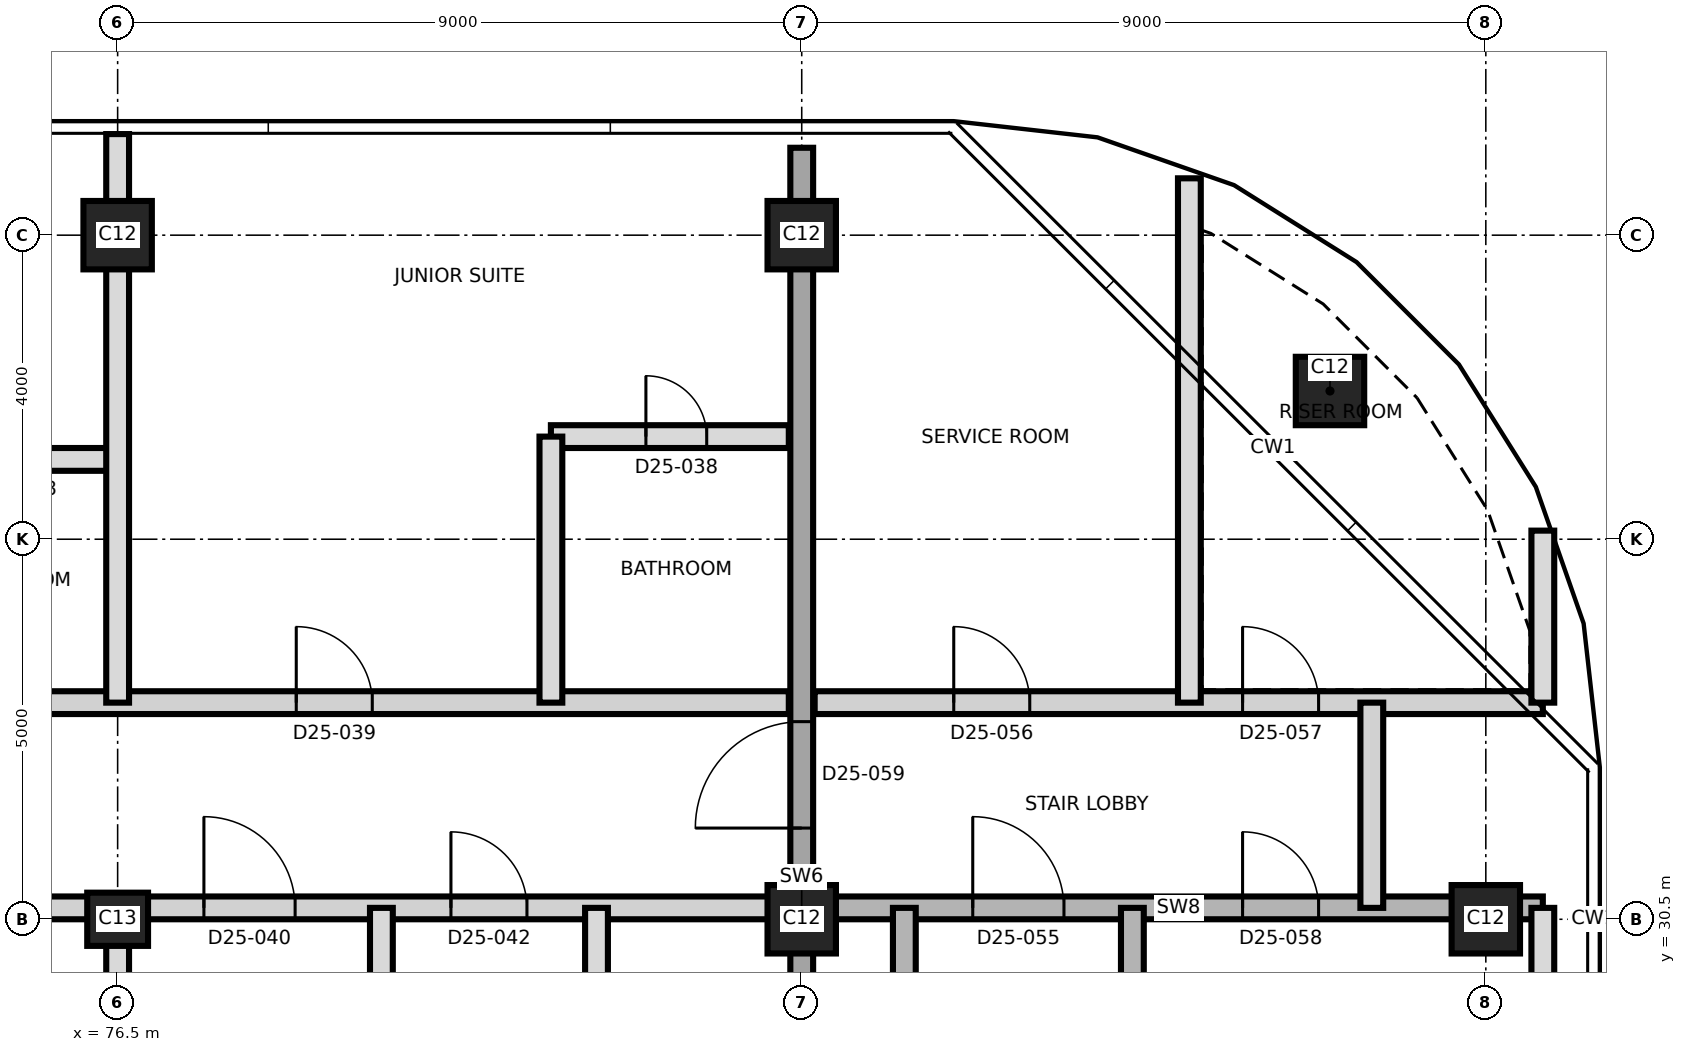
"""IFC4 building model, lengths in metres.
Left out: names, types, materials, properties, quantities, classifications, styles, units other than length and angle.
Written with IfcOpenShell. Run it as: python <this file> out.ifc"""

import sys

from ifc_helpers import new_model, si_unit, direction, frame, frame_2d, origin, origin_2d, place, context, subcontext, project, spatial, rectangle, extrude, element, fill, save


model = new_model("IFC4")
c1 = context("Model", 3, precision=1e-05, world=origin(), true_north=direction((0.0, 1.0)))
c2 = subcontext(c1, "Body", "Model", "MODEL_VIEW")
j1 = project(units=[si_unit("LENGTHUNIT", "METRE"), si_unit("PLANEANGLEUNIT", "RADIAN")], contexts=[c1])
p1 = place(None, origin())
s1 = spatial("IfcSite", under=j1, at=p1, CompositionType="ELEMENT")
p2 = place(p1, origin())
s2 = spatial("IfcBuilding", under=s1, at=p2, CompositionType="ELEMENT")
p3 = place(p2, frame((0.0, 0.0, 229.1)))
s3 = spatial("IfcBuildingStorey", under=s2, at=p3, CompositionType="ELEMENT", Elevation=229.1)
p4 = place(p3, frame((76.5, 30.5, 0.0), z_axis=(0.0, 0.0, 1.0), x_axis=(1.0, 0.0, 0.0)))
e1 = element("IfcColumn", 1, at=p4, inside=s3, PredefinedType="COLUMN", context=c2, shape_type="SweptSolid", body=[
    extrude(rectangle(XDim=0.8, YDim=0.7, at=origin_2d()), origin(), (0.0, 0.0, 1.0), 3.7),
])
for number, where, z_axis, x_axis in (
    (2, (85.5, 30.5, 0.0), (0.0, 0.0, 1.0), (1.0, 0.0, 0.0)),
    (3, (94.5, 30.5, 0.0), (0.0, 0.0, 1.0), (1.0, 0.0, 0.0)),
    (4, (92.45, 37.45, 0.0), (0.0, 0.0, 1.0), (1.0, 0.0, 0.0)),
    (5, (76.5, 39.5, 0.0), (0.0, 0.0, 1.0), (1.0, 0.0, 0.0)),
    (6, (85.5, 39.5, 0.0), (0.0, 0.0, 1.0), (1.0, 0.0, 0.0)),
):
    element("IfcColumn", number, at=place(p3, frame(where, z_axis=z_axis, x_axis=x_axis)), inside=s3, PredefinedType="COLUMN", context=c2, shape_type="SweptSolid", body=[
        extrude(rectangle(XDim=0.9, YDim=0.9, at=origin_2d()), origin(), (0.0, 0.0, 1.0), 3.7),
    ])
p5 = place(p3, frame((85.5, 20.35, 0.0), z_axis=(0.0, 0.0, 1.0), x_axis=(0.0, 1.0, 0.0)))
e7 = element("IfcWall", 7, at=p5, inside=s3, PredefinedType="SHEAR", context=c2, shape_type="SweptSolid", body=[
    extrude(rectangle(XDim=20.3, YDim=0.3, at=frame_2d((10.15, 0.0))), origin(), (0.0, 0.0, 1.0), 3.7),
])
p6 = place(p5, frame((11.35, 0.0, 0.0)))
e8 = element("IfcOpeningElement", 8, at=p6, cuts=e7, PredefinedType="OPENING", context=c2, shape_type="SweptSolid", body=[
    extrude(rectangle(XDim=1.4, YDim=2.1, at=frame_2d((0.7, 1.05))), frame((0.0, 0.16, 0.0), z_axis=(0.0, -1.0, 0.0), x_axis=(1.0, 0.0, 0.0)), (0.0, 0.0, 1.0), 0.32),
])
p7 = place(p3, frame((58.55, 30.65, 0.0), z_axis=(0.0, 0.0, 1.0), x_axis=(1.0, 0.0, 0.0)))
e9 = element("IfcWall", 9, at=p7, inside=s3, PredefinedType="PARTITIONING", context=c2, shape_type="SweptSolid", body=[
    extrude(rectangle(XDim=26.78, YDim=0.3, at=frame_2d((13.39, 0.0))), origin(), (0.0, 0.0, 1.0), 3.4),
])
p8 = place(p7, frame((1.65, 0.0, 0.0)))
e10 = element("IfcOpeningElement", 10, at=p8, cuts=e9, PredefinedType="OPENING", context=c2, shape_type="SweptSolid", body=[
    extrude(rectangle(XDim=1.2, YDim=2.1, at=frame_2d((0.6, 1.05))), frame((0.0, 0.16, 0.0), z_axis=(0.0, -1.0, 0.0), x_axis=(1.0, 0.0, 0.0)), (0.0, 0.0, 1.0), 0.32),
])
p9 = place(p7, frame((4.9, 0.0, 0.0)))
e11 = element("IfcOpeningElement", 11, at=p9, cuts=e9, PredefinedType="OPENING", context=c2, shape_type="SweptSolid", body=[
    extrude(rectangle(XDim=1.0, YDim=2.1, at=frame_2d((0.5, 1.05))), frame((0.0, 0.16, 0.0), z_axis=(0.0, -1.0, 0.0), x_axis=(1.0, 0.0, 0.0)), (0.0, 0.0, 1.0), 0.32),
])
p10 = place(p7, frame((12.95, 0.0, 0.0)))
e12 = element("IfcOpeningElement", 12, at=p10, cuts=e9, PredefinedType="OPENING", context=c2, shape_type="SweptSolid", body=[
    extrude(rectangle(XDim=1.0, YDim=2.4, at=frame_2d((0.5, 1.2))), frame((0.0, 0.16, 0.0), z_axis=(0.0, -1.0, 0.0), x_axis=(1.0, 0.0, 0.0)), (0.0, 0.0, 1.0), 0.32),
])
p11 = place(p7, frame((19.085, 0.0, 0.0)))
e13 = element("IfcOpeningElement", 13, at=p11, cuts=e9, PredefinedType="OPENING", context=c2, shape_type="SweptSolid", body=[
    extrude(rectangle(XDim=1.2, YDim=2.1, at=frame_2d((0.6, 1.05))), frame((0.0, 0.16, 0.0), z_axis=(0.0, -1.0, 0.0), x_axis=(1.0, 0.0, 0.0)), (0.0, 0.0, 1.0), 0.32),
])
p12 = place(p7, frame((22.335, 0.0, 0.0)))
e14 = element("IfcOpeningElement", 14, at=p12, cuts=e9, PredefinedType="OPENING", context=c2, shape_type="SweptSolid", body=[
    extrude(rectangle(XDim=1.0, YDim=2.1, at=frame_2d((0.5, 1.05))), frame((0.0, 0.16, 0.0), z_axis=(0.0, -1.0, 0.0), x_axis=(1.0, 0.0, 0.0)), (0.0, 0.0, 1.0), 0.32),
])
p13 = place(p3, frame((85.67, 30.65, 0.0), z_axis=(0.0, 0.0, 1.0), x_axis=(1.0, 0.0, 0.0)))
e15 = element("IfcWall", 15, at=p13, inside=s3, PredefinedType="SHEAR", context=c2, shape_type="SweptSolid", body=[
    extrude(rectangle(XDim=9.58, YDim=0.3, at=frame_2d((4.79, 0.0))), origin(), (0.0, 0.0, 1.0), 3.4),
])
p14 = place(p13, frame((2.08, 0.0, 0.0)))
e16 = element("IfcOpeningElement", 16, at=p14, cuts=e15, PredefinedType="OPENING", context=c2, shape_type="SweptSolid", body=[
    extrude(rectangle(XDim=1.2, YDim=2.1, at=frame_2d((0.6, 1.05))), frame((0.0, 0.16, 0.0), z_axis=(0.0, -1.0, 0.0), x_axis=(1.0, 0.0, 0.0)), (0.0, 0.0, 1.0), 0.32),
])
p15 = place(p13, frame((5.63, 0.0, 0.0)))
e17 = element("IfcOpeningElement", 17, at=p15, cuts=e15, PredefinedType="OPENING", context=c2, shape_type="SweptSolid", body=[
    extrude(rectangle(XDim=1.0, YDim=2.1, at=frame_2d((0.5, 1.05))), frame((0.0, 0.16, 0.0), z_axis=(0.0, -1.0, 0.0), x_axis=(1.0, 0.0, 0.0)), (0.0, 0.0, 1.0), 0.32),
])
p16 = place(p3, frame((58.55, 33.35, 0.0), z_axis=(0.0, 0.0, 1.0), x_axis=(1.0, 0.0, 0.0)))
e18 = element("IfcWall", 18, at=p16, inside=s3, PredefinedType="PARTITIONING", context=c2, shape_type="SweptSolid", body=[
    extrude(rectangle(XDim=26.78, YDim=0.3, at=frame_2d((13.39, 0.0))), origin(), (0.0, 0.0, 1.0), 3.4),
])
p17 = place(p16, frame((3.95, 0.0, 0.0)))
e19 = element("IfcOpeningElement", 19, at=p17, cuts=e18, PredefinedType="OPENING", context=c2, shape_type="SweptSolid", body=[
    extrude(rectangle(XDim=1.0, YDim=2.4, at=frame_2d((0.5, 1.2))), frame((0.0, 0.16, 0.0), z_axis=(0.0, -1.0, 0.0), x_axis=(1.0, 0.0, 0.0)), (0.0, 0.0, 1.0), 0.32),
])
p18 = place(p16, frame((10.085, 0.0, 0.0)))
e20 = element("IfcOpeningElement", 20, at=p18, cuts=e18, PredefinedType="OPENING", context=c2, shape_type="SweptSolid", body=[
    extrude(rectangle(XDim=1.2, YDim=2.1, at=frame_2d((0.6, 1.05))), frame((0.0, 0.16, 0.0), z_axis=(0.0, -1.0, 0.0), x_axis=(1.0, 0.0, 0.0)), (0.0, 0.0, 1.0), 0.32),
])
p19 = place(p16, frame((13.335, 0.0, 0.0)))
e21 = element("IfcOpeningElement", 21, at=p19, cuts=e18, PredefinedType="OPENING", context=c2, shape_type="SweptSolid", body=[
    extrude(rectangle(XDim=1.0, YDim=2.1, at=frame_2d((0.5, 1.05))), frame((0.0, 0.16, 0.0), z_axis=(0.0, -1.0, 0.0), x_axis=(1.0, 0.0, 0.0)), (0.0, 0.0, 1.0), 0.32),
])
p20 = place(p16, frame((20.3, 0.0, 0.0)))
e22 = element("IfcOpeningElement", 22, at=p20, cuts=e18, PredefinedType="OPENING", context=c2, shape_type="SweptSolid", body=[
    extrude(rectangle(XDim=1.0, YDim=2.4, at=frame_2d((0.5, 1.2))), frame((0.0, 0.16, 0.0), z_axis=(0.0, -1.0, 0.0), x_axis=(1.0, 0.0, 0.0)), (0.0, 0.0, 1.0), 0.32),
])
p21 = place(p3, frame((85.67, 33.35, 0.0), z_axis=(0.0, 0.0, 1.0), x_axis=(1.0, 0.0, 0.0)))
e23 = element("IfcWall", 23, at=p21, inside=s3, PredefinedType="PARTITIONING", context=c2, shape_type="SweptSolid", body=[
    extrude(rectangle(XDim=9.58, YDim=0.3, at=frame_2d((4.79, 0.0))), origin(), (0.0, 0.0, 1.0), 3.4),
])
p22 = place(p21, frame((1.83, 0.0, 0.0)))
e24 = element("IfcOpeningElement", 24, at=p22, cuts=e23, PredefinedType="OPENING", context=c2, shape_type="SweptSolid", body=[
    extrude(rectangle(XDim=1.0, YDim=2.1, at=frame_2d((0.5, 1.05))), frame((0.0, 0.16, 0.0), z_axis=(0.0, -1.0, 0.0), x_axis=(1.0, 0.0, 0.0)), (0.0, 0.0, 1.0), 0.32),
])
p23 = place(p21, frame((5.63, 0.0, 0.0)))
e25 = element("IfcOpeningElement", 25, at=p23, cuts=e23, PredefinedType="OPENING", context=c2, shape_type="SweptSolid", body=[
    extrude(rectangle(XDim=1.0, YDim=2.1, at=frame_2d((0.5, 1.05))), frame((0.0, 0.16, 0.0), z_axis=(0.0, -1.0, 0.0), x_axis=(1.0, 0.0, 0.0)), (0.0, 0.0, 1.0), 0.32),
])
p24 = place(p3, frame((73.8, 36.55, 0.0), z_axis=(0.0, 0.0, 1.0), x_axis=(1.0, 0.0, 0.0)))
e26 = element("IfcWall", 26, at=p24, inside=s3, PredefinedType="PARTITIONING", context=c2, shape_type="SweptSolid", body=[
    extrude(rectangle(XDim=2.7, YDim=0.3, at=frame_2d((1.35, 0.0))), origin(), (0.0, 0.0, 1.0), 3.4),
])
p25 = place(p24, frame((0.95, 0.0, 0.0)))
e27 = element("IfcOpeningElement", 27, at=p25, cuts=e26, PredefinedType="OPENING", context=c2, shape_type="SweptSolid", body=[
    extrude(rectangle(XDim=0.8, YDim=2.1, at=frame_2d((0.4, 1.05))), frame((0.0, 0.16, 0.0), z_axis=(0.0, -1.0, 0.0), x_axis=(1.0, 0.0, 0.0)), (0.0, 0.0, 1.0), 0.32),
])
p26 = place(p3, frame((82.2, 36.85, 0.0), z_axis=(0.0, 0.0, 1.0), x_axis=(1.0, 0.0, 0.0)))
e28 = element("IfcWall", 28, at=p26, inside=s3, PredefinedType="PARTITIONING", context=c2, shape_type="SweptSolid", body=[
    extrude(rectangle(XDim=3.13, YDim=0.3, at=frame_2d((1.565, 0.0))), origin(), (0.0, 0.0, 1.0), 3.4),
])
p27 = place(p26, frame((1.25, 0.0, 0.0)))
e29 = element("IfcOpeningElement", 29, at=p27, cuts=e28, PredefinedType="OPENING", context=c2, shape_type="SweptSolid", body=[
    extrude(rectangle(XDim=0.8, YDim=2.1, at=frame_2d((0.4, 1.05))), frame((0.0, 0.16, 0.0), z_axis=(0.0, -1.0, 0.0), x_axis=(1.0, 0.0, 0.0)), (0.0, 0.0, 1.0), 0.32),
])
p28 = place(p3, frame((76.5, 20.35, 0.0), z_axis=(0.0, 0.0, 1.0), x_axis=(0.0, 1.0, 0.0)))
e30 = element("IfcWall", 30, at=p28, inside=s3, PredefinedType="PARTITIONING", context=c2, shape_type="SweptSolid", body=[
    extrude(rectangle(XDim=10.3, YDim=0.3, at=frame_2d((5.15, 0.0))), origin(), (0.0, 0.0, 1.0), 3.4),
])
p29 = place(p3, frame((76.5, 33.35, 0.0), z_axis=(0.0, 0.0, 1.0), x_axis=(0.0, 1.0, 0.0)))
e31 = element("IfcWall", 31, at=p29, inside=s3, PredefinedType="PARTITIONING", context=c2, shape_type="SweptSolid", body=[
    extrude(rectangle(XDim=7.48, YDim=0.3, at=frame_2d((3.74, 0.0))), origin(), (0.0, 0.0, 1.0), 3.4),
])
p30 = place(p3, frame((79.97, 20.35, 0.0), z_axis=(0.0, 0.0, 1.0), x_axis=(0.0, 1.0, 0.0)))
e32 = element("IfcWall", 32, at=p30, inside=s3, PredefinedType="PARTITIONING", context=c2, shape_type="SweptSolid", body=[
    extrude(rectangle(XDim=10.3, YDim=0.3, at=frame_2d((5.15, 0.0))), origin(), (0.0, 0.0, 1.0), 3.4),
])
p31 = place(p3, frame((82.2, 33.35, 0.0), z_axis=(0.0, 0.0, 1.0), x_axis=(0.0, 1.0, 0.0)))
e33 = element("IfcWall", 33, at=p31, inside=s3, PredefinedType="PARTITIONING", context=c2, shape_type="SweptSolid", body=[
    extrude(rectangle(XDim=3.5, YDim=0.3, at=frame_2d((1.75, 0.0))), origin(), (0.0, 0.0, 1.0), 3.4),
])
p32 = place(p3, frame((82.8, 27.45, 0.0), z_axis=(0.0, 0.0, 1.0), x_axis=(0.0, 1.0, 0.0)))
e34 = element("IfcWall", 34, at=p32, inside=s3, PredefinedType="PARTITIONING", context=c2, shape_type="SweptSolid", body=[
    extrude(rectangle(XDim=3.2, YDim=0.3, at=frame_2d((1.6, 0.0))), origin(), (0.0, 0.0, 1.0), 3.4),
])
for number, where, z_axis, x_axis in (
    (35, (86.85, 21.8, 0.0), (0.0, 0.0, 1.0), (0.0, 1.0, 0.0)),
    (36, (89.85, 21.8, 0.0), (0.0, 0.0, 1.0), (0.0, 1.0, 0.0)),
):
    element("IfcWall", number, at=place(p3, frame(where, z_axis=z_axis, x_axis=x_axis)), inside=s3, PredefinedType="SHEAR", context=c2, shape_type="SweptSolid", body=[
        extrude(rectangle(XDim=8.85, YDim=0.3, at=frame_2d((4.425, 0.0))), origin(), (0.0, 0.0, 1.0), 3.4),
    ])
p33 = place(p3, frame((90.6, 33.35, 0.0), z_axis=(0.0, 0.0, 1.0), x_axis=(0.0, 1.0, 0.0)))
e37 = element("IfcWall", 37, at=p33, inside=s3, PredefinedType="PARTITIONING", context=c2, shape_type="SweptSolid", body=[
    extrude(rectangle(XDim=6.898, YDim=0.3, at=frame_2d((3.449, 0.0))), origin(), (0.0, 0.0, 1.0), 3.4),
])
p34 = place(p3, frame((93.0, 30.65, 0.0), z_axis=(0.0, 0.0, 1.0), x_axis=(0.0, 1.0, 0.0)))
e38 = element("IfcWall", 38, at=p34, inside=s3, PredefinedType="PARTITIONING", context=c2, shape_type="SweptSolid", body=[
    extrude(rectangle(XDim=2.7, YDim=0.3, at=frame_2d((1.35, 0.0))), origin(), (0.0, 0.0, 1.0), 3.4),
])
p35 = place(p3, frame((95.25, 25.387, 0.0), z_axis=(0.0, 0.0, 1.0), x_axis=(0.0, 1.0, 0.0)))
e39 = element("IfcWall", 39, at=p35, inside=s3, PredefinedType="PARTITIONING", context=c2, shape_type="SweptSolid", body=[
    extrude(rectangle(XDim=5.263, YDim=0.3, at=frame_2d((2.631, 0.0))), origin(), (0.0, 0.0, 1.0), 3.4),
])
p36 = place(p3, frame((95.25, 33.35, 0.0), z_axis=(0.0, 0.0, 1.0), x_axis=(0.0, 1.0, 0.0)))
e40 = element("IfcWall", 40, at=p36, inside=s3, PredefinedType="PARTITIONING", context=c2, shape_type="SweptSolid", body=[
    extrude(rectangle(XDim=2.263, YDim=0.3, at=frame_2d((1.131, 0.0))), origin(), (0.0, 0.0, 1.0), 3.4),
])
p37 = place(p27, origin())
e41 = element("IfcDoor", 41, at=p37, inside=s3, OperationType="SINGLE_SWING_LEFT", PredefinedType="DOOR", context=c2, shape_type="SweptSolid", body=[
    extrude(rectangle(XDim=0.8, YDim=2.1, at=frame_2d((0.4, 1.05))), frame((0.0, 0.025, 0.0), z_axis=(0.0, -1.0, 0.0), x_axis=(1.0, 0.0, 0.0)), (0.0, 0.0, 1.0), 0.05),
])
fill(e29, e41)
p38 = place(p20, origin())
e42 = element("IfcDoor", 42, at=p38, inside=s3, OperationType="SINGLE_SWING_LEFT", PredefinedType="DOOR", context=c2, shape_type="SweptSolid", body=[
    extrude(rectangle(XDim=1.0, YDim=2.4, at=frame_2d((0.5, 1.2))), frame((0.0, 0.025, 0.0), z_axis=(0.0, -1.0, 0.0), x_axis=(1.0, 0.0, 0.0)), (0.0, 0.0, 1.0), 0.05),
])
fill(e22, e42)
p39 = place(p11, origin())
e43 = element("IfcDoor", 43, at=p39, inside=s3, OperationType="SINGLE_SWING_RIGHT", PredefinedType="DOOR", context=c2, shape_type="SweptSolid", body=[
    extrude(rectangle(XDim=1.2, YDim=2.1, at=frame_2d((0.6, 1.05))), frame((0.0, 0.025, 0.0), z_axis=(0.0, -1.0, 0.0), x_axis=(1.0, 0.0, 0.0)), (0.0, 0.0, 1.0), 0.05),
])
fill(e13, e43)
p40 = place(p12, origin())
e44 = element("IfcDoor", 44, at=p40, inside=s3, OperationType="SINGLE_SWING_LEFT", PredefinedType="DOOR", context=c2, shape_type="SweptSolid", body=[
    extrude(rectangle(XDim=1.0, YDim=2.1, at=frame_2d((0.5, 1.05))), frame((0.0, 0.025, 0.0), z_axis=(0.0, -1.0, 0.0), x_axis=(1.0, 0.0, 0.0)), (0.0, 0.0, 1.0), 0.05),
])
fill(e14, e44)
p41 = place(p14, origin())
e45 = element("IfcDoor", 45, at=p41, inside=s3, OperationType="SINGLE_SWING_LEFT", PredefinedType="DOOR", context=c2, shape_type="SweptSolid", body=[
    extrude(rectangle(XDim=1.2, YDim=2.1, at=frame_2d((0.6, 1.05))), frame((0.0, 0.025, 0.0), z_axis=(0.0, -1.0, 0.0), x_axis=(1.0, 0.0, 0.0)), (0.0, 0.0, 1.0), 0.05),
])
fill(e16, e45)
p42 = place(p22, origin())
e46 = element("IfcDoor", 46, at=p42, inside=s3, OperationType="SINGLE_SWING_LEFT", PredefinedType="DOOR", context=c2, shape_type="SweptSolid", body=[
    extrude(rectangle(XDim=1.0, YDim=2.1, at=frame_2d((0.5, 1.05))), frame((0.0, 0.025, 0.0), z_axis=(0.0, -1.0, 0.0), x_axis=(1.0, 0.0, 0.0)), (0.0, 0.0, 1.0), 0.05),
])
fill(e24, e46)
p43 = place(p23, origin())
e47 = element("IfcDoor", 47, at=p43, inside=s3, OperationType="SINGLE_SWING_RIGHT", PredefinedType="DOOR", context=c2, shape_type="SweptSolid", body=[
    extrude(rectangle(XDim=1.0, YDim=2.1, at=frame_2d((0.5, 1.05))), frame((0.0, 0.025, 0.0), z_axis=(0.0, -1.0, 0.0), x_axis=(1.0, 0.0, 0.0)), (0.0, 0.0, 1.0), 0.05),
])
fill(e25, e47)
p44 = place(p15, origin())
e48 = element("IfcDoor", 48, at=p44, inside=s3, OperationType="SINGLE_SWING_LEFT", PredefinedType="DOOR", context=c2, shape_type="SweptSolid", body=[
    extrude(rectangle(XDim=1.0, YDim=2.1, at=frame_2d((0.5, 1.05))), frame((0.0, 0.025, 0.0), z_axis=(0.0, -1.0, 0.0), x_axis=(1.0, 0.0, 0.0)), (0.0, 0.0, 1.0), 0.05),
])
fill(e17, e48)
p45 = place(p6, origin())
e49 = element("IfcDoor", 49, at=p45, inside=s3, OperationType="SINGLE_SWING_RIGHT", PredefinedType="DOOR", context=c2, shape_type="SweptSolid", body=[
    extrude(rectangle(XDim=1.4, YDim=2.1, at=frame_2d((0.7, 1.05))), frame((0.0, 0.025, 0.0), z_axis=(0.0, -1.0, 0.0), x_axis=(1.0, 0.0, 0.0)), (0.0, 0.0, 1.0), 0.05),
])
fill(e8, e49)
save(model, sys.argv[1])
